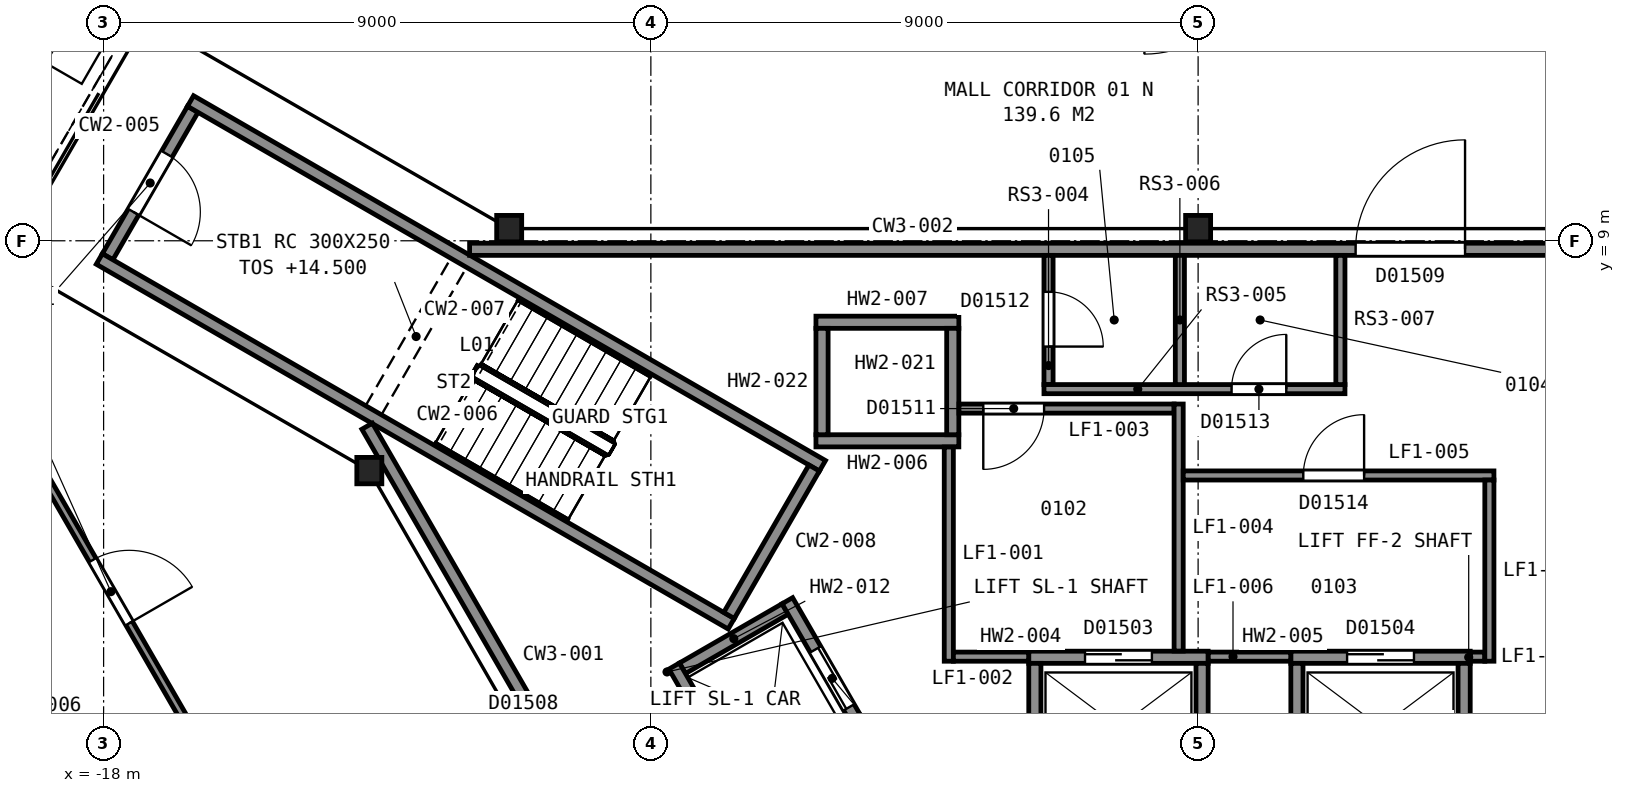
"""IFC4 building model, lengths in metres.
Left out: names, types, materials, properties, quantities, classifications, styles, units other than length and angle.
Written with IfcOpenShell. Run it as: python <this file> out.ifc"""

import sys

from ifc_helpers import new_model, si_unit, direction, frame, frame_2d, origin, origin_2d, place, context, subcontext, project, spatial, rectangle, i_section, extrude, element, fill, save


model = new_model("IFC4")
c1 = context("Model", 3, precision=1e-05, world=origin(), true_north=direction((0.0, 1.0)))
c2 = subcontext(c1, "Body", "Model", "MODEL_VIEW")
j1 = project(units=[si_unit("LENGTHUNIT", "METRE"), si_unit("PLANEANGLEUNIT", "RADIAN")], contexts=[c1])
p1 = place(None, origin())
s1 = spatial("IfcSite", under=j1, at=p1, CompositionType="ELEMENT")
p2 = place(p1, origin())
s2 = spatial("IfcBuilding", under=s1, at=p2, CompositionType="ELEMENT")
p3 = place(p2, frame((0.0, 0.0, 12.0)))
s3 = spatial("IfcBuildingStorey", under=s2, at=p3, CompositionType="ELEMENT", Elevation=12.0)
for number, where, z_axis, x_axis in (
    (1, (0.0, 9.2, 0.0), (0.0, 0.0, 1.0), (1.0, 0.0, 0.0)),
    (2, (-11.33, 9.2, 0.0), (0.0, 0.0, 1.0), (1.0, 0.0, 0.0)),
    (3, (-13.63, 5.22, 0.0), (0.0, 0.0, 1.0), (1.0, 0.0, 0.0)),
):
    element("IfcColumn", number, at=place(p3, frame(where, z_axis=z_axis, x_axis=x_axis)), inside=s3, PredefinedType="COLUMN", context=c2, shape_type="SweptSolid", body=[
        extrude(i_section(OverallWidth=0.411, OverallDepth=0.434, WebThickness=0.036, FlangeThickness=0.057, FilletRadius=0.015, at=origin_2d()), origin(), (0.0, 0.0, 1.0), 5.4),
    ])
p4 = place(p3, frame((-16.534, 11.162, 0.0), z_axis=(0.0, 0.0, 1.0), x_axis=(-0.49998411664, -0.866034573852, 0.0)))
e4 = element("IfcWall", 4, at=p4, inside=s3, PredefinedType="PARTITIONING", context=c2, shape_type="SweptSolid", body=[
    extrude(rectangle(XDim=2.8, YDim=0.2, at=frame_2d((1.4, 0.0))), origin(), (0.0, 0.0, 1.0), 5.15),
])
p5 = place(p4, frame((0.85, 0.0, 0.0)))
e5 = element("IfcOpeningElement", 5, at=p5, cuts=e4, PredefinedType="OPENING", context=c2, shape_type="SweptSolid", body=[
    extrude(rectangle(XDim=1.1, YDim=2.1, at=frame_2d((0.55, 1.05))), frame((0.0, 0.11, 0.0), z_axis=(0.0, -1.0, 0.0), x_axis=(1.0, 0.0, 0.0)), (0.0, 0.0, 1.0), 0.22),
])
for number, where, z_axis, x_axis in (
    (6, (-7.678, 2.701, 0.0), (0.0, 0.0, 1.0), (-0.866, 0.5, 0.0)),
    (7, (-6.178, 5.299, 0.0), (0.0, 0.0, 1.0), (-0.866, 0.5, 0.0)),
):
    element("IfcWall", number, at=place(p3, frame(where, z_axis=z_axis, x_axis=x_axis)), inside=s3, PredefinedType="PARTITIONING", context=c2, shape_type="SweptSolid", body=[
        extrude(rectangle(XDim=12.0, YDim=0.2, at=frame_2d((6.0, 0.0))), origin(), (0.0, 0.0, 1.0), 5.15),
    ])
p6 = place(p3, frame((-6.315, 5.262, 0.0), z_axis=(0.0, 0.0, 1.0), x_axis=(-0.500049511043, -0.865996816683, 0.0)))
e8 = element("IfcWall", 8, at=p6, inside=s3, PredefinedType="PARTITIONING", context=c2, shape_type="SweptSolid", body=[
    extrude(rectangle(XDim=2.8, YDim=0.2, at=frame_2d((1.4, 0.0))), origin(), (0.0, 0.0, 1.0), 5.15),
])
p7 = place(p3, frame((-2.785, 2.15, 0.0), z_axis=(0.0, 0.0, 1.0), x_axis=(1.0, 0.0, 0.0)))
e9 = element("IfcWall", 9, at=p7, inside=s3, PredefinedType="PARTITIONING", context=c2, shape_type="SweptSolid", body=[
    extrude(rectangle(XDim=2.95, YDim=0.2, at=frame_2d((1.475, 0.0))), origin(), (0.0, 0.0, 1.0), 5.4),
])
p8 = place(p7, frame((0.925, 0.0, 0.0)))
e10 = element("IfcOpeningElement", 10, at=p8, cuts=e9, PredefinedType="OPENING", context=c2, shape_type="SweptSolid", body=[
    extrude(rectangle(XDim=1.1, YDim=2.1, at=frame_2d((0.55, 1.05))), frame((0.0, 0.11, 0.0), z_axis=(0.0, -1.0, 0.0), x_axis=(1.0, 0.0, 0.0)), (0.0, 0.0, 1.0), 0.22),
])
p9 = place(p3, frame((1.525, 2.15, 0.0), z_axis=(0.0, 0.0, 1.0), x_axis=(1.0, 0.0, 0.0)))
e11 = element("IfcWall", 11, at=p9, inside=s3, PredefinedType="PARTITIONING", context=c2, shape_type="SweptSolid", body=[
    extrude(rectangle(XDim=2.95, YDim=0.2, at=frame_2d((1.475, 0.0))), origin(), (0.0, 0.0, 1.0), 5.4),
])
p10 = place(p9, frame((0.925, 0.0, 0.0)))
e12 = element("IfcOpeningElement", 12, at=p10, cuts=e11, PredefinedType="OPENING", context=c2, shape_type="SweptSolid", body=[
    extrude(rectangle(XDim=1.1, YDim=2.1, at=frame_2d((0.55, 1.05))), frame((0.0, 0.11, 0.0), z_axis=(0.0, -1.0, 0.0), x_axis=(1.0, 0.0, 0.0)), (0.0, 0.0, 1.0), 0.22),
])
for number, where, z_axis, x_axis in (
    (13, (-6.285, 5.71, 0.0), (0.0, 0.0, 1.0), (1.0, 0.0, 0.0)),
    (14, (-6.285, 7.66, 0.0), (0.0, 0.0, 1.0), (1.0, 0.0, 0.0)),
):
    element("IfcWall", number, at=place(p3, frame(where, z_axis=z_axis, x_axis=x_axis)), inside=s3, PredefinedType="PARTITIONING", context=c2, shape_type="SweptSolid", body=[
        extrude(rectangle(XDim=2.35, YDim=0.2, at=frame_2d((1.175, 0.0))), origin(), (0.0, 0.0, 1.0), 5.4),
    ])
p11 = place(p3, frame((-8.48, 1.969, 0.0), z_axis=(0.0, 0.0, 1.0), x_axis=(0.866000020948, 0.500043961785, 0.0)))
e15 = element("IfcWall", 15, at=p11, inside=s3, PredefinedType="PARTITIONING", context=c2, shape_type="SweptSolid", body=[
    extrude(rectangle(XDim=1.95, YDim=0.2, at=frame_2d((0.975, 0.0))), origin(), (0.0, 0.0, 1.0), 5.4),
])
p12 = place(p3, frame((5.663, -1.612, 0.0), z_axis=(0.0, 0.0, 1.0), x_axis=(0.49998122708, 0.866036242063, 0.0)))
e16 = element("IfcWall", 16, at=p12, inside=s3, PredefinedType="PARTITIONING", context=c2, shape_type="SweptSolid", body=[
    extrude(rectangle(XDim=4.9, YDim=0.2, at=frame_2d((2.45, 0.0))), origin(), (0.0, 0.0, 1.0), 5.4),
])
for number, where, z_axis, x_axis in (
    (17, (4.375, 0.1, 0.0), (0.0, 0.0, 1.0), (0.0, 1.0, 0.0)),
    (18, (1.625, 0.1, 0.0), (0.0, 0.0, 1.0), (0.0, 1.0, 0.0)),
    (19, (0.065, 0.1, 0.0), (0.0, 0.0, 1.0), (0.0, 1.0, 0.0)),
    (20, (-2.685, 0.1, 0.0), (0.0, 0.0, 1.0), (0.0, 1.0, 0.0)),
):
    element("IfcWall", number, at=place(p3, frame(where, z_axis=z_axis, x_axis=x_axis)), inside=s3, PredefinedType="PARTITIONING", context=c2, shape_type="SweptSolid", body=[
        extrude(rectangle(XDim=1.95, YDim=0.2, at=frame_2d((0.975, 0.0))), origin(), (0.0, 0.0, 1.0), 5.4),
    ])
for number, where, z_axis, x_axis in (
    (21, (-4.035, 5.81, 0.0), (0.0, 0.0, 1.0), (0.0, 1.0, 0.0)),
    (22, (-6.185, 5.81, 0.0), (0.0, 0.0, 1.0), (0.0, 1.0, 0.0)),
):
    element("IfcWall", number, at=place(p3, frame(where, z_axis=z_axis, x_axis=x_axis)), inside=s3, PredefinedType="PARTITIONING", context=c2, shape_type="SweptSolid", body=[
        extrude(rectangle(XDim=1.75, YDim=0.2, at=frame_2d((0.875, 0.0))), origin(), (0.0, 0.0, 1.0), 5.4),
    ])
p13 = place(p3, frame((-5.28, 0.525, 0.0), z_axis=(0.0, 0.0, 1.0), x_axis=(-0.500037662692, 0.866003658127, 0.0)))
e23 = element("IfcWall", 23, at=p13, inside=s3, PredefinedType="PARTITIONING", context=c2, shape_type="SweptSolid", body=[
    extrude(rectangle(XDim=2.95, YDim=0.2, at=frame_2d((1.475, 0.0))), origin(), (0.0, 0.0, 1.0), 5.4),
])
p14 = place(p13, frame((0.925, 0.0, 0.0)))
e24 = element("IfcOpeningElement", 24, at=p14, cuts=e23, PredefinedType="OPENING", context=c2, shape_type="SweptSolid", body=[
    extrude(rectangle(XDim=1.1, YDim=2.1, at=frame_2d((0.55, 1.05))), frame((0.0, 0.11, 0.0), z_axis=(0.0, -1.0, 0.0), x_axis=(1.0, 0.0, 0.0)), (0.0, 0.0, 1.0), 0.22),
])
p15 = place(p3, frame((-7.242, -0.376, 0.0), z_axis=(0.0, 0.0, 1.0), x_axis=(-0.499996545922, 0.866027397988, 0.0)))
e25 = element("IfcWall", 25, at=p15, inside=s3, PredefinedType="PARTITIONING", context=c2, shape_type="SweptSolid", body=[
    extrude(rectangle(XDim=2.75, YDim=0.2, at=frame_2d((1.375, 0.0))), origin(), (0.0, 0.0, 1.0), 5.4),
])
p16 = place(p3, frame((-13.666, 5.95, 0.0), z_axis=(0.0, 0.0, 1.0), x_axis=(0.499971736997, -0.866041720822, 0.0)))
e26 = element("IfcWall", 26, at=p16, inside=s3, PredefinedType="PARTITIONING", context=c2, shape_type="SweptSolid", body=[
    extrude(rectangle(XDim=14.949, YDim=0.2, at=frame_2d((7.475, 0.0))), origin(), (0.0, 0.0, 1.0), 5.15),
])
p17 = place(p16, frame((8.69, 0.0, 0.0)))
e27 = element("IfcOpeningElement", 27, at=p17, cuts=e26, PredefinedType="OPENING", context=c2, shape_type="SweptSolid", body=[
    extrude(rectangle(XDim=1.8, YDim=2.1, at=frame_2d((0.9, 1.05))), frame((0.0, 0.11, 0.0), z_axis=(0.0, -1.0, 0.0), x_axis=(1.0, 0.0, 0.0)), (0.0, 0.0, 1.0), 0.22),
])
p18 = place(p3, frame((11.986, 8.86, 0.0), z_axis=(0.0, 0.0, 1.0), x_axis=(-1.0, 0.0, 0.0)))
e28 = element("IfcWall", 28, at=p18, inside=s3, PredefinedType="PARTITIONING", context=c2, shape_type="SweptSolid", body=[
    extrude(rectangle(XDim=23.967, YDim=0.2, at=frame_2d((11.983, 0.0))), origin(), (0.0, 0.0, 1.0), 5.15),
])
p19 = place(p18, frame((7.596, 0.0, 0.0)))
e29 = element("IfcOpeningElement", 29, at=p19, cuts=e28, PredefinedType="OPENING", context=c2, shape_type="SweptSolid", body=[
    extrude(rectangle(XDim=1.8, YDim=2.1, at=frame_2d((0.9, 1.05))), frame((0.0, 0.11, 0.0), z_axis=(0.0, -1.0, 0.0), x_axis=(1.0, 0.0, 0.0)), (0.0, 0.0, 1.0), 0.22),
])
p20 = place(p3, frame((-4.1, 2.085, 0.0), z_axis=(0.0, 0.0, 1.0), x_axis=(0.0, 1.0, 0.0)))
e30 = element("IfcWall", 30, at=p20, inside=s3, PredefinedType="PARTITIONING", context=c2, shape_type="SweptSolid", body=[
    extrude(rectangle(XDim=3.523, YDim=0.15, at=frame_2d((1.761, 0.0))), origin(), (0.0, 0.0, 1.0), 5.15),
])
p21 = place(p3, frame((-4.025, 2.16, 0.0), z_axis=(0.0, 0.0, 1.0), x_axis=(1.0, 0.0, 0.0)))
e31 = element("IfcWall", 31, at=p21, inside=s3, PredefinedType="PARTITIONING", context=c2, shape_type="SweptSolid", body=[
    extrude(rectangle(XDim=1.238, YDim=0.15, at=frame_2d((0.619, 0.0))), origin(), (0.0, 0.0, 1.0), 5.15),
])
p22 = place(p3, frame((-3.933, 6.24, 0.0), z_axis=(0.0, 0.0, 1.0), x_axis=(1.0, 0.0, 0.0)))
e32 = element("IfcWall", 32, at=p22, inside=s3, PredefinedType="PARTITIONING", context=c2, shape_type="SweptSolid", body=[
    extrude(rectangle(XDim=3.538, YDim=0.15, at=frame_2d((1.769, 0.0))), origin(), (0.0, 0.0, 1.0), 5.15),
])
p23 = place(p22, frame((0.4, 0.0, 0.0)))
e33 = element("IfcOpeningElement", 33, at=p23, cuts=e32, PredefinedType="OPENING", context=c2, shape_type="SweptSolid", body=[
    extrude(rectangle(XDim=1.0, YDim=2.1, at=frame_2d((0.5, 1.05))), frame((0.0, 0.085, 0.0), z_axis=(0.0, -1.0, 0.0), x_axis=(1.0, 0.0, 0.0)), (0.0, 0.0, 1.0), 0.17),
])
p24 = place(p3, frame((-2.46, 8.76, 0.0), z_axis=(0.0, 0.0, 1.0), x_axis=(0.0, -1.0, 0.0)))
e34 = element("IfcWall", 34, at=p24, inside=s3, PredefinedType="PARTITIONING", context=c2, shape_type="SweptSolid", body=[
    extrude(rectangle(XDim=2.125, YDim=0.15, at=frame_2d((1.062, 0.0))), origin(), (0.0, 0.0, 1.0), 5.15),
])
p25 = place(p24, frame((0.6, 0.0, 0.0)))
e35 = element("IfcOpeningElement", 35, at=p25, cuts=e34, PredefinedType="OPENING", context=c2, shape_type="SweptSolid", body=[
    extrude(rectangle(XDim=0.9, YDim=2.1, at=frame_2d((0.45, 1.05))), frame((0.0, 0.085, 0.0), z_axis=(0.0, -1.0, 0.0), x_axis=(1.0, 0.0, 0.0)), (0.0, 0.0, 1.0), 0.17),
])
p26 = place(p3, frame((-2.535, 6.56, 0.0), z_axis=(0.0, 0.0, 1.0), x_axis=(1.0, 0.0, 0.0)))
e36 = element("IfcWall", 36, at=p26, inside=s3, PredefinedType="PARTITIONING", context=c2, shape_type="SweptSolid", body=[
    extrude(rectangle(XDim=4.95, YDim=0.15, at=frame_2d((2.475, 0.0))), origin(), (0.0, 0.0, 1.0), 5.15),
])
p27 = place(p26, frame((3.085, 0.0, 0.0)))
e37 = element("IfcOpeningElement", 37, at=p27, cuts=e36, PredefinedType="OPENING", context=c2, shape_type="SweptSolid", body=[
    extrude(rectangle(XDim=0.9, YDim=2.1, at=frame_2d((0.45, 1.05))), frame((0.0, 0.085, 0.0), z_axis=(0.0, -1.0, 0.0), x_axis=(1.0, 0.0, 0.0)), (0.0, 0.0, 1.0), 0.17),
])
p28 = place(p3, frame((-0.32, 2.252, 0.0), z_axis=(0.0, 0.0, 1.0), x_axis=(0.0, 1.0, 0.0)))
e38 = element("IfcWall", 38, at=p28, inside=s3, PredefinedType="PARTITIONING", context=c2, shape_type="SweptSolid", body=[
    extrude(rectangle(XDim=4.063, YDim=0.15, at=frame_2d((2.031, 0.0))), origin(), (0.0, 0.0, 1.0), 5.15),
])
p29 = place(p3, frame((-0.245, 5.14, 0.0), z_axis=(0.0, 0.0, 1.0), x_axis=(1.0, 0.0, 0.0)))
e39 = element("IfcWall", 39, at=p29, inside=s3, PredefinedType="PARTITIONING", context=c2, shape_type="SweptSolid", body=[
    extrude(rectangle(XDim=5.11, YDim=0.15, at=frame_2d((2.555, 0.0))), origin(), (0.0, 0.0, 1.0), 5.15),
])
p30 = place(p29, frame((1.975, 0.0, 0.0)))
e40 = element("IfcOpeningElement", 40, at=p30, cuts=e39, PredefinedType="OPENING", context=c2, shape_type="SweptSolid", body=[
    extrude(rectangle(XDim=1.0, YDim=2.1, at=frame_2d((0.5, 1.05))), frame((0.0, 0.085, 0.0), z_axis=(0.0, -1.0, 0.0), x_axis=(1.0, 0.0, 0.0)), (0.0, 0.0, 1.0), 0.17),
])
p31 = place(p3, frame((-0.3, 6.635, 0.0), z_axis=(0.0, 0.0, 1.0), x_axis=(0.0, 1.0, 0.0)))
e41 = element("IfcWall", 41, at=p31, inside=s3, PredefinedType="PARTITIONING", context=c2, shape_type="SweptSolid", body=[
    extrude(rectangle(XDim=2.125, YDim=0.15, at=frame_2d((1.062, 0.0))), origin(), (0.0, 0.0, 1.0), 5.15),
])
p32 = place(p3, frame((0.167, 2.16, 0.0), z_axis=(0.0, 0.0, 1.0), x_axis=(1.0, 0.0, 0.0)))
e42 = element("IfcWall", 42, at=p32, inside=s3, PredefinedType="PARTITIONING", context=c2, shape_type="SweptSolid", body=[
    extrude(rectangle(XDim=1.356, YDim=0.15, at=frame_2d((0.678, 0.0))), origin(), (0.0, 0.0, 1.0), 5.15),
])
p33 = place(p3, frame((1.68, -14.811, 0.0), z_axis=(0.0, 0.0, 1.0), x_axis=(0.499994327219, 0.866028678941, 0.0)))
e43 = element("IfcWall", 43, at=p33, inside=s3, PredefinedType="PARTITIONING", context=c2, shape_type="SweptSolid", body=[
    extrude(rectangle(XDim=23.968, YDim=0.2, at=frame_2d((11.984, 0.0))), origin(), (0.0, 0.0, 1.0), 5.15),
])
p34 = place(p33, frame((13.44, 0.0, 0.0)))
e44 = element("IfcOpeningElement", 44, at=p34, cuts=e43, PredefinedType="OPENING", context=c2, shape_type="SweptSolid", body=[
    extrude(rectangle(XDim=1.8, YDim=2.1, at=frame_2d((0.9, 1.05))), frame((0.0, 0.11, 0.0), z_axis=(0.0, -1.0, 0.0), x_axis=(1.0, 0.0, 0.0)), (0.0, 0.0, 1.0), 0.22),
])
p35 = place(p3, frame((2.34, 6.635, 0.0), z_axis=(0.0, 0.0, 1.0), x_axis=(0.0, 1.0, 0.0)))
e45 = element("IfcWall", 45, at=p35, inside=s3, PredefinedType="PARTITIONING", context=c2, shape_type="SweptSolid", body=[
    extrude(rectangle(XDim=2.125, YDim=0.15, at=frame_2d((1.062, 0.0))), origin(), (0.0, 0.0, 1.0), 5.15),
])
p36 = place(p3, frame((4.477, 2.16, 0.0), z_axis=(0.0, 0.0, 1.0), x_axis=(1.0, 0.0, 0.0)))
e46 = element("IfcWall", 46, at=p36, inside=s3, PredefinedType="PARTITIONING", context=c2, shape_type="SweptSolid", body=[
    extrude(rectangle(XDim=0.238, YDim=0.15, at=frame_2d((0.119, 0.0))), origin(), (0.0, 0.0, 1.0), 5.15),
])
p37 = place(p3, frame((4.79, 2.085, 0.0), z_axis=(0.0, 0.0, 1.0), x_axis=(0.0, 1.0, 0.0)))
e47 = element("IfcWall", 47, at=p37, inside=s3, PredefinedType="PARTITIONING", context=c2, shape_type="SweptSolid", body=[
    extrude(rectangle(XDim=2.98, YDim=0.15, at=frame_2d((1.49, 0.0))), origin(), (0.0, 0.0, 1.0), 5.15),
])
p38 = place(p3, frame((-4.438, -20.054, 0.0), z_axis=(0.0, 0.0, 1.0), x_axis=(-0.499994028088, 0.866028851642, 0.0)))
e48 = element("IfcWall", 48, at=p38, inside=s3, PredefinedType="PARTITIONING", context=c2, shape_type="SweptSolid", body=[
    extrude(rectangle(XDim=30.297, YDim=0.125, at=frame_2d((15.148, 0.0))), origin(), (0.0, 0.0, 1.0), 4.253),
])
p39 = place(p38, frame((26.285, 0.0, 0.0)))
e49 = element("IfcOpeningElement", 49, at=p39, cuts=e48, PredefinedType="OPENING", context=c2, shape_type="SweptSolid", body=[
    extrude(rectangle(XDim=1.2, YDim=2.1, at=frame_2d((0.6, 1.05))), frame((0.0, 0.073, 0.0), z_axis=(0.0, -1.0, 0.0), x_axis=(1.0, 0.0, 0.0)), (0.0, 0.0, 1.0), 0.145),
])
p40 = place(p38, frame((16.731, 0.0, 0.0)))
e50 = element("IfcOpeningElement", 50, at=p40, cuts=e48, PredefinedType="OPENING", context=c2, shape_type="SweptSolid", body=[
    extrude(rectangle(XDim=1.0, YDim=2.1, at=frame_2d((0.5, 1.05))), frame((0.0, 0.073, 0.0), z_axis=(0.0, -1.0, 0.0), x_axis=(1.0, 0.0, 0.0)), (0.0, 0.0, 1.0), 0.145),
])
p41 = place(p38, frame((8.257, 0.0, 0.0)))
e51 = element("IfcOpeningElement", 51, at=p41, cuts=e48, PredefinedType="OPENING", context=c2, shape_type="SweptSolid", body=[
    extrude(rectangle(XDim=1.2, YDim=2.1, at=frame_2d((0.6, 1.05))), frame((0.0, 0.073, 0.0), z_axis=(0.0, -1.0, 0.0), x_axis=(1.0, 0.0, 0.0)), (0.0, 0.0, 1.0), 0.145),
])
p42 = place(p38, frame((2.916, 0.0, 0.0)))
e52 = element("IfcOpeningElement", 52, at=p42, cuts=e48, PredefinedType="OPENING", context=c2, shape_type="SweptSolid", body=[
    extrude(rectangle(XDim=1.0, YDim=2.1, at=frame_2d((0.5, 1.05))), frame((0.0, 0.073, 0.0), z_axis=(0.0, -1.0, 0.0), x_axis=(1.0, 0.0, 0.0)), (0.0, 0.0, 1.0), 0.145),
])
p43 = place(p3, frame((19.586, 6.184, 0.0), z_axis=(0.0, 0.0, 1.0), x_axis=(-0.499994028088, -0.866028851642, 0.0)))
e53 = element("IfcWall", 53, at=p43, inside=s3, PredefinedType="PARTITIONING", context=c2, shape_type="SweptSolid", body=[
    extrude(rectangle(XDim=30.297, YDim=0.125, at=frame_2d((15.148, 0.0))), origin(), (0.0, 0.0, 1.0), 4.253),
])
p44 = place(p43, frame((26.285, 0.0, 0.0)))
e54 = element("IfcOpeningElement", 54, at=p44, cuts=e53, PredefinedType="OPENING", context=c2, shape_type="SweptSolid", body=[
    extrude(rectangle(XDim=1.2, YDim=2.1, at=frame_2d((0.6, 1.05))), frame((0.0, 0.073, 0.0), z_axis=(0.0, -1.0, 0.0), x_axis=(1.0, 0.0, 0.0)), (0.0, 0.0, 1.0), 0.145),
])
p45 = place(p43, frame((18.732, 0.0, 0.0)))
e55 = element("IfcOpeningElement", 55, at=p45, cuts=e53, PredefinedType="OPENING", context=c2, shape_type="SweptSolid", body=[
    extrude(rectangle(XDim=1.2, YDim=2.1, at=frame_2d((0.6, 1.05))), frame((0.0, 0.073, 0.0), z_axis=(0.0, -1.0, 0.0), x_axis=(1.0, 0.0, 0.0)), (0.0, 0.0, 1.0), 0.145),
])
p46 = place(p5, origin())
e56 = element("IfcDoor", 56, at=p46, inside=s3, OperationType="SINGLE_SWING_RIGHT", PredefinedType="DOOR", context=c2, shape_type="SweptSolid", body=[
    extrude(rectangle(XDim=1.1, YDim=2.1, at=frame_2d((0.55, 1.05))), frame((0.0, 0.025, 0.0), z_axis=(0.0, -1.0, 0.0), x_axis=(1.0, 0.0, 0.0)), (0.0, 0.0, 1.0), 0.05),
])
fill(e5, e56)
p47 = place(p8, origin())
e57 = element("IfcDoor", 57, at=p47, inside=s3, OperationType="SLIDING_TO_LEFT", PredefinedType="DOOR", context=c2, shape_type="SweptSolid", body=[
    extrude(rectangle(XDim=1.1, YDim=2.1, at=frame_2d((0.55, 1.05))), frame((0.0, 0.025, 0.0), z_axis=(0.0, -1.0, 0.0), x_axis=(1.0, 0.0, 0.0)), (0.0, 0.0, 1.0), 0.05),
])
fill(e10, e57)
p48 = place(p10, origin())
e58 = element("IfcDoor", 58, at=p48, inside=s3, OperationType="SLIDING_TO_RIGHT", PredefinedType="DOOR", context=c2, shape_type="SweptSolid", body=[
    extrude(rectangle(XDim=1.1, YDim=2.1, at=frame_2d((0.55, 1.05))), frame((0.0, 0.025, 0.0), z_axis=(0.0, -1.0, 0.0), x_axis=(1.0, 0.0, 0.0)), (0.0, 0.0, 1.0), 0.05),
])
fill(e12, e58)
p49 = place(p14, origin())
e59 = element("IfcDoor", 59, at=p49, inside=s3, OperationType="SLIDING_TO_LEFT", PredefinedType="DOOR", context=c2, shape_type="SweptSolid", body=[
    extrude(rectangle(XDim=1.1, YDim=2.1, at=frame_2d((0.55, 1.05))), frame((0.0, 0.025, 0.0), z_axis=(0.0, -1.0, 0.0), x_axis=(1.0, 0.0, 0.0)), (0.0, 0.0, 1.0), 0.05),
])
fill(e24, e59)
p50 = place(p19, origin())
e60 = element("IfcDoor", 60, at=p50, inside=s3, OperationType="DOUBLE_DOOR_SINGLE_SWING", PredefinedType="DOOR", context=c2, shape_type="SweptSolid", body=[
    extrude(rectangle(XDim=1.8, YDim=2.1, at=frame_2d((0.9, 1.05))), frame((0.0, 0.025, 0.0), z_axis=(0.0, -1.0, 0.0), x_axis=(1.0, 0.0, 0.0)), (0.0, 0.0, 1.0), 0.05),
])
fill(e29, e60)
p51 = place(p23, origin())
e61 = element("IfcDoor", 61, at=p51, inside=s3, OperationType="SINGLE_SWING_LEFT", PredefinedType="DOOR", context=c2, shape_type="SweptSolid", body=[
    extrude(rectangle(XDim=1.0, YDim=2.1, at=frame_2d((0.5, 1.05))), frame((0.0, 0.025, 0.0), z_axis=(0.0, -1.0, 0.0), x_axis=(1.0, 0.0, 0.0)), (0.0, 0.0, 1.0), 0.05),
])
fill(e33, e61)
p52 = place(p25, origin())
e62 = element("IfcDoor", 62, at=p52, inside=s3, OperationType="SINGLE_SWING_RIGHT", PredefinedType="DOOR", context=c2, shape_type="SweptSolid", body=[
    extrude(rectangle(XDim=0.9, YDim=2.1, at=frame_2d((0.45, 1.05))), frame((0.0, 0.025, 0.0), z_axis=(0.0, -1.0, 0.0), x_axis=(1.0, 0.0, 0.0)), (0.0, 0.0, 1.0), 0.05),
])
fill(e35, e62)
p53 = place(p27, origin())
e63 = element("IfcDoor", 63, at=p53, inside=s3, OperationType="SINGLE_SWING_RIGHT", PredefinedType="DOOR", context=c2, shape_type="SweptSolid", body=[
    extrude(rectangle(XDim=0.9, YDim=2.1, at=frame_2d((0.45, 1.05))), frame((0.0, 0.025, 0.0), z_axis=(0.0, -1.0, 0.0), x_axis=(1.0, 0.0, 0.0)), (0.0, 0.0, 1.0), 0.05),
])
fill(e37, e63)
p54 = place(p30, origin())
e64 = element("IfcDoor", 64, at=p54, inside=s3, OperationType="SINGLE_SWING_RIGHT", PredefinedType="DOOR", context=c2, shape_type="SweptSolid", body=[
    extrude(rectangle(XDim=1.0, YDim=2.1, at=frame_2d((0.5, 1.05))), frame((0.0, 0.025, 0.0), z_axis=(0.0, -1.0, 0.0), x_axis=(1.0, 0.0, 0.0)), (0.0, 0.0, 1.0), 0.05),
])
fill(e40, e64)
p55 = place(p39, origin())
e65 = element("IfcDoor", 65, at=p55, inside=s3, OperationType="SINGLE_SWING_LEFT", PredefinedType="DOOR", context=c2, shape_type="SweptSolid", body=[
    extrude(rectangle(XDim=1.2, YDim=2.1, at=frame_2d((0.6, 1.05))), frame((0.0, 0.025, 0.0), z_axis=(0.0, -1.0, 0.0), x_axis=(1.0, 0.0, 0.0)), (0.0, 0.0, 1.0), 0.05),
])
fill(e49, e65)
save(model, sys.argv[1])
